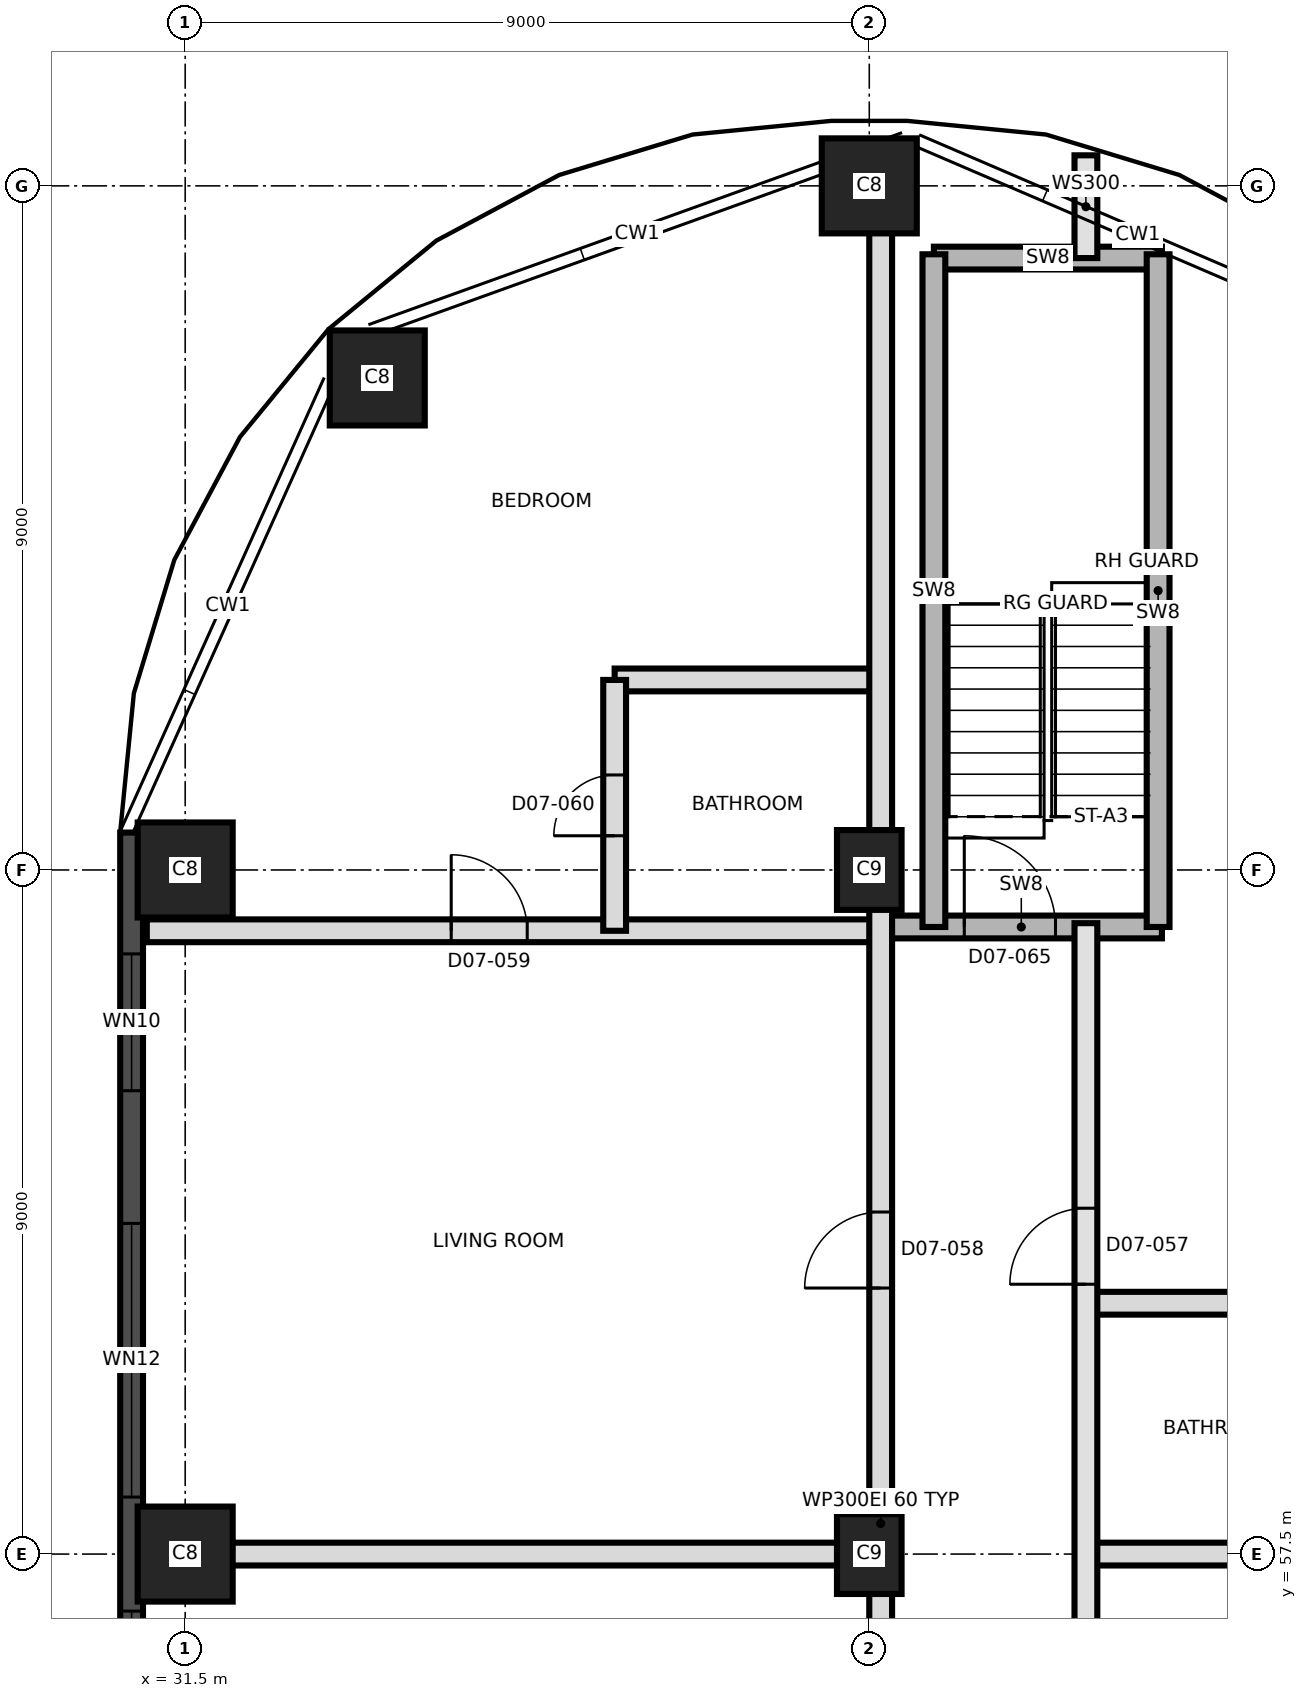
"""IFC4 building model, lengths in metres.
Left out: names, types, materials, properties, quantities, classifications, styles, units other than length and angle.
Written with IfcOpenShell. Run it as: python <this file> out.ifc"""

import sys

from ifc_helpers import new_model, si_unit, direction, frame, frame_2d, origin, origin_2d, place, context, subcontext, project, spatial, rectangle, extrude, element, fill, save


model = new_model("IFC4")
c1 = context("Model", 3, precision=1e-05, world=origin(), true_north=direction((0.0, 1.0)))
c2 = subcontext(c1, "Body", "Model", "MODEL_VIEW")
j1 = project(units=[si_unit("LENGTHUNIT", "METRE"), si_unit("PLANEANGLEUNIT", "RADIAN")], contexts=[c1])
p1 = place(None, origin())
s1 = spatial("IfcSite", under=j1, at=p1, CompositionType="ELEMENT")
p2 = place(p1, origin())
s2 = spatial("IfcBuilding", under=s1, at=p2, CompositionType="ELEMENT")
p3 = place(p2, frame((0.0, 0.0, 90.8)))
s3 = spatial("IfcBuildingStorey", under=s2, at=p3, CompositionType="ELEMENT", Elevation=90.8)
p4 = place(p3, frame((31.5, 57.5, 0.0), z_axis=(0.0, 0.0, 1.0), x_axis=(1.0, 0.0, 0.0)))
e1 = element("IfcColumn", 1, at=p4, inside=s3, PredefinedType="COLUMN", context=c2, shape_type="SweptSolid", body=[
    extrude(rectangle(XDim=1.25, YDim=1.25, at=origin_2d()), origin(), (0.0, 0.0, 1.0), 3.7),
])
p5 = place(p3, frame((40.5, 57.5, 0.0), z_axis=(0.0, 0.0, 1.0), x_axis=(0.0, 1.0, 0.0)))
e2 = element("IfcColumn", 2, at=p5, inside=s3, PredefinedType="COLUMN", context=c2, shape_type="SweptSolid", body=[
    extrude(rectangle(XDim=1.05, YDim=0.85, at=origin_2d()), origin(), (0.0, 0.0, 1.0), 3.7),
])
p6 = place(p3, frame((31.5, 66.5, 0.0), z_axis=(0.0, 0.0, 1.0), x_axis=(1.0, 0.0, 0.0)))
e3 = element("IfcColumn", 3, at=p6, inside=s3, PredefinedType="COLUMN", context=c2, shape_type="SweptSolid", body=[
    extrude(rectangle(XDim=1.25, YDim=1.25, at=origin_2d()), origin(), (0.0, 0.0, 1.0), 3.7),
])
p7 = place(p3, frame((40.5, 66.5, 0.0), z_axis=(0.0, 0.0, 1.0), x_axis=(0.0, 1.0, 0.0)))
e4 = element("IfcColumn", 4, at=p7, inside=s3, PredefinedType="COLUMN", context=c2, shape_type="SweptSolid", body=[
    extrude(rectangle(XDim=1.05, YDim=0.85, at=origin_2d()), origin(), (0.0, 0.0, 1.0), 3.7),
])
for number, where, z_axis, x_axis in (
    (5, (34.027, 72.973, 0.0), (0.0, 0.0, 1.0), (1.0, 0.0, 0.0)),
    (6, (40.5, 75.5, 0.0), (0.0, 0.0, 1.0), (1.0, 0.0, 0.0)),
):
    element("IfcColumn", number, at=place(p3, frame(where, z_axis=z_axis, x_axis=x_axis)), inside=s3, PredefinedType="COLUMN", context=c2, shape_type="SweptSolid", body=[
        extrude(rectangle(XDim=1.25, YDim=1.25, at=origin_2d()), origin(), (0.0, 0.0, 1.0), 3.7),
    ])
p8 = place(p3, frame((30.795, 66.992, 0.0), z_axis=(0.0, 0.0, 1.0), x_axis=(0.0, -1.0, 0.0)))
e7 = element("IfcWall", 7, at=p8, inside=s3, PredefinedType="SOLIDWALL", context=c2, shape_type="SweptSolid", body=[
    extrude(rectangle(XDim=32.981, YDim=0.3, at=frame_2d((16.491, 0.0))), origin(), (0.0, 0.0, 1.0), 3.4),
])
p9 = place(p8, frame((1.596, 0.0, 0.3)))
e8 = element("IfcOpeningElement", 8, at=p9, cuts=e7, PredefinedType="OPENING", context=c2, shape_type="SweptSolid", body=[
    extrude(rectangle(XDim=1.8, YDim=2.4, at=frame_2d((0.9, 1.2))), frame((0.0, 0.16, 0.0), z_axis=(0.0, -1.0, 0.0), x_axis=(1.0, 0.0, 0.0)), (0.0, 0.0, 1.0), 0.32),
])
p10 = place(p8, frame((5.142, 0.0, 0.9)))
e9 = element("IfcOpeningElement", 9, at=p10, cuts=e7, PredefinedType="OPENING", context=c2, shape_type="SweptSolid", body=[
    extrude(rectangle(XDim=3.6, YDim=1.5, at=frame_2d((1.8, 0.75))), frame((0.0, 0.16, 0.0), z_axis=(0.0, -1.0, 0.0), x_axis=(1.0, 0.0, 0.0)), (0.0, 0.0, 1.0), 0.32),
])
p11 = place(p8, frame((10.242, 0.0, 0.9)))
e10 = element("IfcOpeningElement", 10, at=p11, cuts=e7, PredefinedType="OPENING", context=c2, shape_type="SweptSolid", body=[
    extrude(rectangle(XDim=3.6, YDim=1.5, at=frame_2d((1.8, 0.75))), frame((0.0, 0.16, 0.0), z_axis=(0.0, -1.0, 0.0), x_axis=(1.0, 0.0, 0.0)), (0.0, 0.0, 1.0), 0.32),
])
p12 = place(p8, frame((14.142, 0.0, 0.9)))
e11 = element("IfcOpeningElement", 11, at=p12, cuts=e7, PredefinedType="OPENING", context=c2, shape_type="SweptSolid", body=[
    extrude(rectangle(XDim=3.6, YDim=1.5, at=frame_2d((1.8, 0.75))), frame((0.0, 0.16, 0.0), z_axis=(0.0, -1.0, 0.0), x_axis=(1.0, 0.0, 0.0)), (0.0, 0.0, 1.0), 0.32),
])
p13 = place(p8, frame((19.242, 0.0, 0.9)))
e12 = element("IfcOpeningElement", 12, at=p13, cuts=e7, PredefinedType="OPENING", context=c2, shape_type="SweptSolid", body=[
    extrude(rectangle(XDim=3.6, YDim=1.5, at=frame_2d((1.8, 0.75))), frame((0.0, 0.16, 0.0), z_axis=(0.0, -1.0, 0.0), x_axis=(1.0, 0.0, 0.0)), (0.0, 0.0, 1.0), 0.32),
])
p14 = place(p8, frame((23.142, 0.0, 0.9)))
e13 = element("IfcOpeningElement", 13, at=p14, cuts=e7, PredefinedType="OPENING", context=c2, shape_type="SweptSolid", body=[
    extrude(rectangle(XDim=4.2, YDim=1.5, at=frame_2d((2.1, 0.75))), frame((0.0, 0.16, 0.0), z_axis=(0.0, -1.0, 0.0), x_axis=(1.0, 0.0, 0.0)), (0.0, 0.0, 1.0), 0.32),
])
p15 = place(p8, frame((29.337, 0.0, 0.3)))
e14 = element("IfcOpeningElement", 14, at=p15, cuts=e7, PredefinedType="OPENING", context=c2, shape_type="SweptSolid", body=[
    extrude(rectangle(XDim=1.8, YDim=2.4, at=frame_2d((0.9, 1.2))), frame((0.0, 0.16, 0.0), z_axis=(0.0, -1.0, 0.0), x_axis=(1.0, 0.0, 0.0)), (0.0, 0.0, 1.0), 0.32),
])
p16 = place(p3, frame((30.995, 57.5, 0.0), z_axis=(0.0, 0.0, 1.0), x_axis=(1.0, 0.0, 0.0)))
e15 = element("IfcWall", 15, at=p16, inside=s3, PredefinedType="PARTITIONING", context=c2, shape_type="SweptSolid", body=[
    extrude(rectangle(XDim=9.655, YDim=0.3, at=frame_2d((4.827, 0.0))), origin(), (0.0, 0.0, 1.0), 3.4),
])
p17 = place(p3, frame((43.35, 57.5, 0.0), z_axis=(0.0, 0.0, 1.0), x_axis=(1.0, 0.0, 0.0)))
e16 = element("IfcWall", 16, at=p17, inside=s3, PredefinedType="PARTITIONING", context=c2, shape_type="SweptSolid", body=[
    extrude(rectangle(XDim=6.655, YDim=0.3, at=frame_2d((3.327, 0.0))), origin(), (0.0, 0.0, 1.0), 3.4),
])
p18 = place(p3, frame((43.35, 60.8, 0.0), z_axis=(0.0, 0.0, 1.0), x_axis=(1.0, 0.0, 0.0)))
e17 = element("IfcWall", 17, at=p18, inside=s3, PredefinedType="PARTITIONING", context=c2, shape_type="SweptSolid", body=[
    extrude(rectangle(XDim=3.5, YDim=0.3, at=frame_2d((1.75, 0.0))), origin(), (0.0, 0.0, 1.0), 3.4),
])
p19 = place(p3, frame((30.995, 65.7, 0.0), z_axis=(0.0, 0.0, 1.0), x_axis=(1.0, 0.0, 0.0)))
e18 = element("IfcWall", 18, at=p19, inside=s3, PredefinedType="PARTITIONING", context=c2, shape_type="SweptSolid", body=[
    extrude(rectangle(XDim=9.655, YDim=0.3, at=frame_2d((4.827, 0.0))), origin(), (0.0, 0.0, 1.0), 3.4),
])
p20 = place(p19, frame((4.005, 0.0, 0.0)))
e19 = element("IfcOpeningElement", 19, at=p20, cuts=e18, PredefinedType="OPENING", context=c2, shape_type="SweptSolid", body=[
    extrude(rectangle(XDim=1.0, YDim=2.1, at=frame_2d((0.5, 1.05))), frame((0.0, 0.16, 0.0), z_axis=(0.0, -1.0, 0.0), x_axis=(1.0, 0.0, 0.0)), (0.0, 0.0, 1.0), 0.32),
])
p21 = place(p3, frame((40.65, 65.75, 0.0), z_axis=(0.0, 0.0, 1.0), x_axis=(1.0, 0.0, 0.0)))
e20 = element("IfcWall", 20, at=p21, inside=s3, PredefinedType="SHEAR", context=c2, shape_type="SweptSolid", body=[
    extrude(rectangle(XDim=3.7, YDim=0.3, at=frame_2d((1.85, 0.0))), origin(), (0.0, 0.0, 1.0), 3.4),
])
p22 = place(p21, frame((1.1, 0.0, 0.0)))
e21 = element("IfcOpeningElement", 21, at=p22, cuts=e20, PredefinedType="OPENING", context=c2, shape_type="SweptSolid", body=[
    extrude(rectangle(XDim=1.2, YDim=2.1, at=frame_2d((0.6, 1.05))), frame((0.0, 0.16, 0.0), z_axis=(0.0, -1.0, 0.0), x_axis=(1.0, 0.0, 0.0)), (0.0, 0.0, 1.0), 0.32),
])
p23 = place(p3, frame((37.15, 69.0, 0.0), z_axis=(0.0, 0.0, 1.0), x_axis=(1.0, 0.0, 0.0)))
e22 = element("IfcWall", 22, at=p23, inside=s3, PredefinedType="PARTITIONING", context=c2, shape_type="SweptSolid", body=[
    extrude(rectangle(XDim=3.5, YDim=0.3, at=frame_2d((1.75, 0.0))), origin(), (0.0, 0.0, 1.0), 3.4),
])
p24 = place(p3, frame((41.35, 74.55, 0.0), z_axis=(0.0, 0.0, 1.0), x_axis=(1.0, 0.0, 0.0)))
e23 = element("IfcWall", 23, at=p24, inside=s3, PredefinedType="SHEAR", context=c2, shape_type="SweptSolid", body=[
    extrude(rectangle(XDim=3.0, YDim=0.3, at=frame_2d((1.5, 0.0))), origin(), (0.0, 0.0, 1.0), 3.4),
])
p25 = place(p3, frame((37.15, 65.7, 0.0), z_axis=(0.0, 0.0, 1.0), x_axis=(0.0, 1.0, 0.0)))
e24 = element("IfcWall", 24, at=p25, inside=s3, PredefinedType="PARTITIONING", context=c2, shape_type="SweptSolid", body=[
    extrude(rectangle(XDim=3.3, YDim=0.3, at=frame_2d((1.65, 0.0))), origin(), (0.0, 0.0, 1.0), 3.4),
])
p26 = place(p25, frame((1.25, 0.0, 0.0)))
e25 = element("IfcOpeningElement", 25, at=p26, cuts=e24, PredefinedType="OPENING", context=c2, shape_type="SweptSolid", body=[
    extrude(rectangle(XDim=0.8, YDim=2.1, at=frame_2d((0.4, 1.05))), frame((0.0, 0.16, 0.0), z_axis=(0.0, -1.0, 0.0), x_axis=(1.0, 0.0, 0.0)), (0.0, 0.0, 1.0), 0.32),
])
p27 = place(p3, frame((40.65, 39.8, 0.0), z_axis=(0.0, 0.0, 1.0), x_axis=(0.0, 1.0, 0.0)))
e26 = element("IfcWall", 26, at=p27, inside=s3, PredefinedType="PARTITIONING", context=c2, shape_type="SweptSolid", body=[
    extrude(rectangle(XDim=36.205, YDim=0.3, at=frame_2d((18.103, 0.0))), origin(), (0.0, 0.0, 1.0), 3.4),
])
p28 = place(p27, frame((0.835, 0.0, 0.0)))
e27 = element("IfcOpeningElement", 27, at=p28, cuts=e26, PredefinedType="OPENING", context=c2, shape_type="SweptSolid", body=[
    extrude(rectangle(XDim=1.2, YDim=2.1, at=frame_2d((0.6, 1.05))), frame((0.0, 0.16, 0.0), z_axis=(0.0, -1.0, 0.0), x_axis=(1.0, 0.0, 0.0)), (0.0, 0.0, 1.0), 0.32),
])
p29 = place(p27, frame((4.085, 0.0, 0.0)))
e28 = element("IfcOpeningElement", 28, at=p29, cuts=e26, PredefinedType="OPENING", context=c2, shape_type="SweptSolid", body=[
    extrude(rectangle(XDim=1.0, YDim=2.1, at=frame_2d((0.5, 1.05))), frame((0.0, 0.16, 0.0), z_axis=(0.0, -1.0, 0.0), x_axis=(1.0, 0.0, 0.0)), (0.0, 0.0, 1.0), 0.32),
])
p30 = place(p27, frame((14.35, 0.0, 0.0)))
e29 = element("IfcOpeningElement", 29, at=p30, cuts=e26, PredefinedType="OPENING", context=c2, shape_type="SweptSolid", body=[
    extrude(rectangle(XDim=1.0, YDim=2.4, at=frame_2d((0.5, 1.2))), frame((0.0, 0.16, 0.0), z_axis=(0.0, -1.0, 0.0), x_axis=(1.0, 0.0, 0.0)), (0.0, 0.0, 1.0), 0.32),
])
p31 = place(p27, frame((21.2, 0.0, 0.0)))
e30 = element("IfcOpeningElement", 30, at=p31, cuts=e26, PredefinedType="OPENING", context=c2, shape_type="SweptSolid", body=[
    extrude(rectangle(XDim=1.0, YDim=2.4, at=frame_2d((0.5, 1.2))), frame((0.0, 0.16, 0.0), z_axis=(0.0, -1.0, 0.0), x_axis=(1.0, 0.0, 0.0)), (0.0, 0.0, 1.0), 0.32),
])
p32 = place(p3, frame((41.35, 65.75, 0.0), z_axis=(0.0, 0.0, 1.0), x_axis=(0.0, 1.0, 0.0)))
e31 = element("IfcWall", 31, at=p32, inside=s3, PredefinedType="SHEAR", context=c2, shape_type="SweptSolid", body=[
    extrude(rectangle(XDim=8.85, YDim=0.3, at=frame_2d((4.425, 0.0))), origin(), (0.0, 0.0, 1.0), 3.4),
])
p33 = place(p3, frame((43.35, 39.8, 0.0), z_axis=(0.0, 0.0, 1.0), x_axis=(0.0, 1.0, 0.0)))
e32 = element("IfcWall", 32, at=p33, inside=s3, PredefinedType="SOLIDWALL", context=c2, shape_type="SweptSolid", body=[
    extrude(rectangle(XDim=26.0, YDim=0.3, at=frame_2d((13.0, 0.0))), origin(), (0.0, 0.0, 1.0), 3.4),
])
p34 = place(p33, frame((3.115, 0.0, 0.0)))
e33 = element("IfcOpeningElement", 33, at=p34, cuts=e32, PredefinedType="OPENING", context=c2, shape_type="SweptSolid", body=[
    extrude(rectangle(XDim=1.0, YDim=2.1, at=frame_2d((0.5, 1.05))), frame((0.0, 0.16, 0.0), z_axis=(0.0, -1.0, 0.0), x_axis=(1.0, 0.0, 0.0)), (0.0, 0.0, 1.0), 0.32),
])
p35 = place(p33, frame((6.065, 0.0, 0.0)))
e34 = element("IfcOpeningElement", 34, at=p35, cuts=e32, PredefinedType="OPENING", context=c2, shape_type="SweptSolid", body=[
    extrude(rectangle(XDim=1.4, YDim=2.1, at=frame_2d((0.7, 1.05))), frame((0.0, 0.16, 0.0), z_axis=(0.0, -1.0, 0.0), x_axis=(1.0, 0.0, 0.0)), (0.0, 0.0, 1.0), 0.32),
])
p36 = place(p33, frame((9.835, 0.0, 0.0)))
e35 = element("IfcOpeningElement", 35, at=p36, cuts=e32, PredefinedType="OPENING", context=c2, shape_type="SweptSolid", body=[
    extrude(rectangle(XDim=1.2, YDim=2.1, at=frame_2d((0.6, 1.05))), frame((0.0, 0.16, 0.0), z_axis=(0.0, -1.0, 0.0), x_axis=(1.0, 0.0, 0.0)), (0.0, 0.0, 1.0), 0.32),
])
p37 = place(p33, frame((13.085, 0.0, 0.0)))
e36 = element("IfcOpeningElement", 36, at=p37, cuts=e32, PredefinedType="OPENING", context=c2, shape_type="SweptSolid", body=[
    extrude(rectangle(XDim=1.0, YDim=2.1, at=frame_2d((0.5, 1.05))), frame((0.0, 0.16, 0.0), z_axis=(0.0, -1.0, 0.0), x_axis=(1.0, 0.0, 0.0)), (0.0, 0.0, 1.0), 0.32),
])
p38 = place(p33, frame((21.25, 0.0, 0.0)))
e37 = element("IfcOpeningElement", 37, at=p38, cuts=e32, PredefinedType="OPENING", context=c2, shape_type="SweptSolid", body=[
    extrude(rectangle(XDim=1.0, YDim=2.4, at=frame_2d((0.5, 1.2))), frame((0.0, 0.16, 0.0), z_axis=(0.0, -1.0, 0.0), x_axis=(1.0, 0.0, 0.0)), (0.0, 0.0, 1.0), 0.32),
])
p39 = place(p3, frame((43.35, 74.55, 0.0), z_axis=(0.0, 0.0, 1.0), x_axis=(0.0, 1.0, 0.0)))
e38 = element("IfcWall", 38, at=p39, inside=s3, PredefinedType="SOLIDWALL", context=c2, shape_type="SweptSolid", body=[
    extrude(rectangle(XDim=1.352, YDim=0.3, at=frame_2d((0.676, 0.0))), origin(), (0.0, 0.0, 1.0), 3.4),
])
p40 = place(p3, frame((44.3, 65.75, 0.0), z_axis=(0.0, 0.0, 1.0), x_axis=(0.0, 1.0, 0.0)))
e39 = element("IfcWall", 39, at=p40, inside=s3, PredefinedType="SHEAR", context=c2, shape_type="SweptSolid", body=[
    extrude(rectangle(XDim=8.85, YDim=0.3, at=frame_2d((4.425, 0.0))), origin(), (0.0, 0.0, 1.0), 3.4),
])
p41 = place(p9, origin())
e40 = element("IfcWindow", 40, at=p41, inside=s3, PartitioningType="SINGLE_PANEL", PredefinedType="WINDOW", context=c2, shape_type="SweptSolid", body=[
    extrude(rectangle(XDim=1.8, YDim=2.4, at=frame_2d((0.9, 1.2))), frame((0.0, 0.03, 0.0), z_axis=(0.0, -1.0, 0.0), x_axis=(1.0, 0.0, 0.0)), (0.0, 0.0, 1.0), 0.06),
])
fill(e8, e40)
p42 = place(p10, origin())
e41 = element("IfcWindow", 41, at=p42, inside=s3, PartitioningType="SINGLE_PANEL", PredefinedType="WINDOW", context=c2, shape_type="SweptSolid", body=[
    extrude(rectangle(XDim=3.6, YDim=1.5, at=frame_2d((1.8, 0.75))), frame((0.0, 0.03, 0.0), z_axis=(0.0, -1.0, 0.0), x_axis=(1.0, 0.0, 0.0)), (0.0, 0.0, 1.0), 0.06),
])
fill(e9, e41)
p43 = place(p11, origin())
e42 = element("IfcWindow", 42, at=p43, inside=s3, PartitioningType="SINGLE_PANEL", PredefinedType="WINDOW", context=c2, shape_type="SweptSolid", body=[
    extrude(rectangle(XDim=3.6, YDim=1.5, at=frame_2d((1.8, 0.75))), frame((0.0, 0.03, 0.0), z_axis=(0.0, -1.0, 0.0), x_axis=(1.0, 0.0, 0.0)), (0.0, 0.0, 1.0), 0.06),
])
fill(e10, e42)
p44 = place(p38, origin())
e43 = element("IfcDoor", 43, at=p44, inside=s3, OperationType="SINGLE_SWING_LEFT", PredefinedType="DOOR", context=c2, shape_type="SweptSolid", body=[
    extrude(rectangle(XDim=1.0, YDim=2.4, at=frame_2d((0.5, 1.2))), frame((0.0, 0.025, 0.0), z_axis=(0.0, -1.0, 0.0), x_axis=(1.0, 0.0, 0.0)), (0.0, 0.0, 1.0), 0.05),
])
fill(e37, e43)
p45 = place(p31, origin())
e44 = element("IfcDoor", 44, at=p45, inside=s3, OperationType="SINGLE_SWING_RIGHT", PredefinedType="DOOR", context=c2, shape_type="SweptSolid", body=[
    extrude(rectangle(XDim=1.0, YDim=2.4, at=frame_2d((0.5, 1.2))), frame((0.0, 0.025, 0.0), z_axis=(0.0, -1.0, 0.0), x_axis=(1.0, 0.0, 0.0)), (0.0, 0.0, 1.0), 0.05),
])
fill(e30, e44)
p46 = place(p20, origin())
e45 = element("IfcDoor", 45, at=p46, inside=s3, OperationType="SINGLE_SWING_LEFT", PredefinedType="DOOR", context=c2, shape_type="SweptSolid", body=[
    extrude(rectangle(XDim=1.0, YDim=2.1, at=frame_2d((0.5, 1.05))), frame((0.0, 0.025, 0.0), z_axis=(0.0, -1.0, 0.0), x_axis=(1.0, 0.0, 0.0)), (0.0, 0.0, 1.0), 0.05),
])
fill(e19, e45)
p47 = place(p26, origin())
e46 = element("IfcDoor", 46, at=p47, inside=s3, OperationType="SINGLE_SWING_LEFT", PredefinedType="DOOR", context=c2, shape_type="SweptSolid", body=[
    extrude(rectangle(XDim=0.8, YDim=2.1, at=frame_2d((0.4, 1.05))), frame((0.0, 0.025, 0.0), z_axis=(0.0, -1.0, 0.0), x_axis=(1.0, 0.0, 0.0)), (0.0, 0.0, 1.0), 0.05),
])
fill(e25, e46)
p48 = place(p22, origin())
e47 = element("IfcDoor", 47, at=p48, inside=s3, OperationType="SINGLE_SWING_RIGHT", PredefinedType="DOOR", context=c2, shape_type="SweptSolid", body=[
    extrude(rectangle(XDim=1.2, YDim=2.1, at=frame_2d((0.6, 1.05))), frame((0.0, 0.025, 0.0), z_axis=(0.0, -1.0, 0.0), x_axis=(1.0, 0.0, 0.0)), (0.0, 0.0, 1.0), 0.05),
])
fill(e21, e47)
save(model, sys.argv[1])
